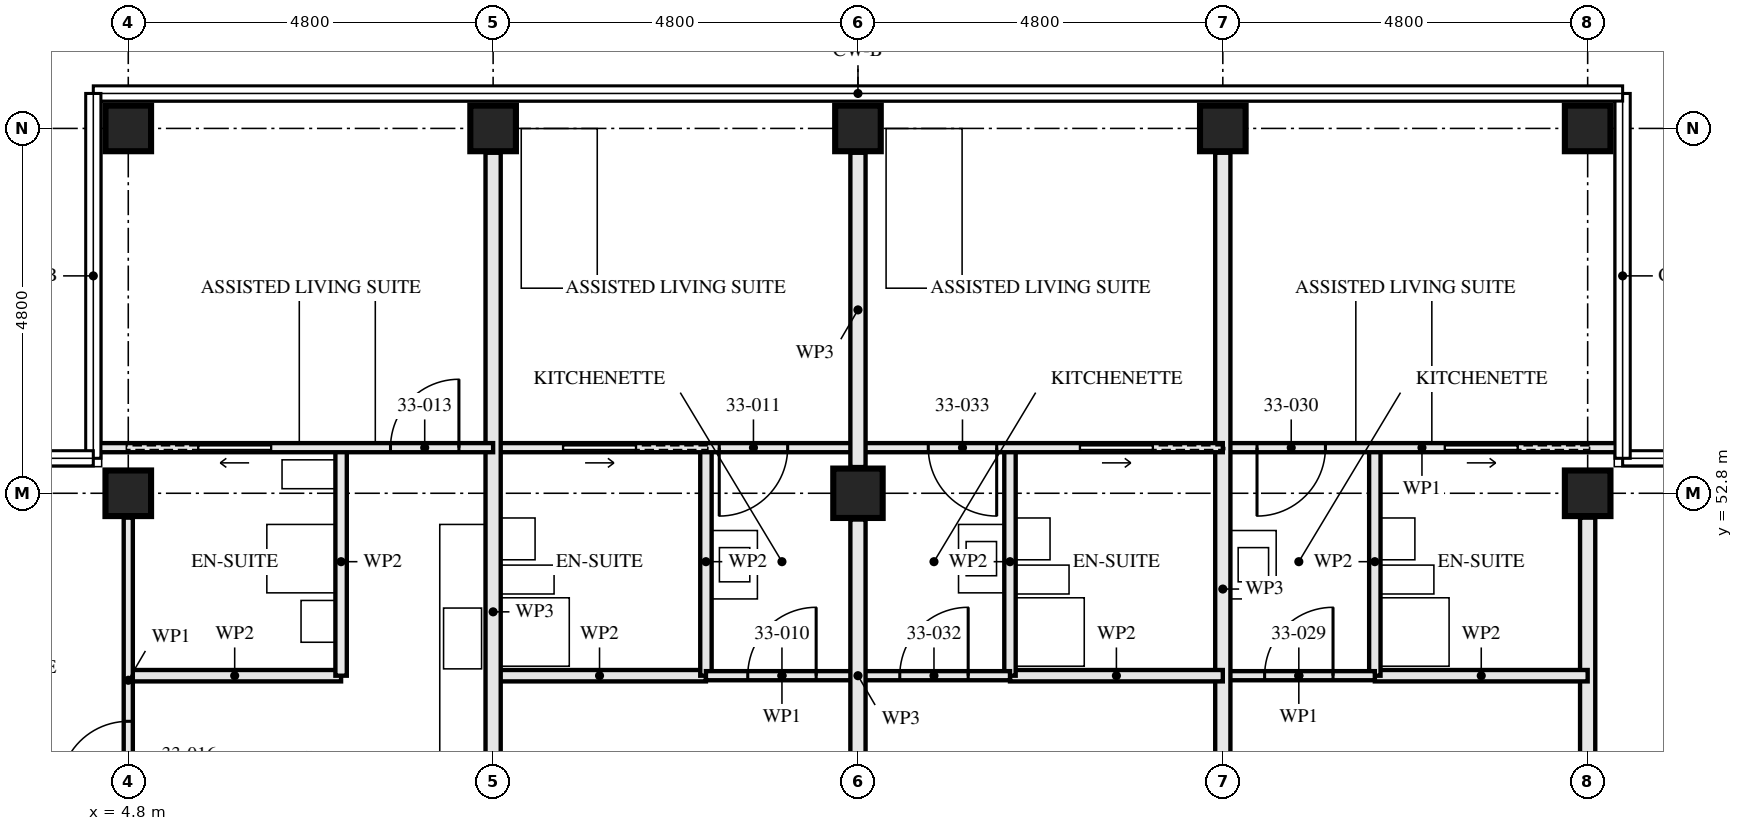
"""IFC4 building model, lengths in metres.
Left out: names, types, materials, properties, quantities, classifications, styles, units other than length and angle.
Written with IfcOpenShell. Run it as: python <this file> out.ifc"""

import sys

from ifc_helpers import new_model, si_unit, direction, frame, frame_2d, origin, origin_2d, place, context, subcontext, project, spatial, rectangle, hollow_rectangle, extrude, element, fill, save


model = new_model("IFC4")
c1 = context("Model", 3, precision=1e-05, world=origin(), true_north=direction((0.0, 1.0)))
c2 = subcontext(c1, "Body", "Model", "MODEL_VIEW")
j1 = project(units=[si_unit("LENGTHUNIT", "METRE"), si_unit("PLANEANGLEUNIT", "RADIAN")], contexts=[c1])
p1 = place(None, origin())
s1 = spatial("IfcSite", under=j1, at=p1, CompositionType="ELEMENT")
p2 = place(p1, origin())
s2 = spatial("IfcBuilding", under=s1, at=p2, CompositionType="ELEMENT")
p3 = place(p2, frame((0.0, 0.0, 122.5)))
s3 = spatial("IfcBuildingStorey", under=s2, at=p3, CompositionType="ELEMENT", Elevation=122.5)
for number, where, z_axis, x_axis in (
    (1, (4.8, 52.8, 0.0), (0.0, 0.0, 1.0), (0.0, 1.0, 0.0)),
    (2, (4.8, 57.6, 0.0), (0.0, 0.0, 1.0), (0.0, 1.0, 0.0)),
    (3, (9.6, 57.6, 0.0), (0.0, 0.0, 1.0), (0.0, 1.0, 0.0)),
):
    element("IfcColumn", number, at=place(p3, frame(where, z_axis=z_axis, x_axis=x_axis)), inside=s3, PredefinedType="COLUMN", context=c2, shape_type="SweptSolid", body=[
        extrude(hollow_rectangle(XDim=0.6, YDim=0.6, WallThickness=0.08, at=origin_2d()), origin(), (0.0, 0.0, 1.0), 3.5),
    ])
p4 = place(p3, frame((14.4, 52.8, 0.0), z_axis=(0.0, 0.0, 1.0), x_axis=(1.0, 0.0, 0.0)))
e4 = element("IfcColumn", 4, at=p4, inside=s3, PredefinedType="COLUMN", context=c2, shape_type="SweptSolid", body=[
    extrude(hollow_rectangle(XDim=0.65, YDim=0.65, WallThickness=0.05, at=origin_2d()), origin(), (0.0, 0.0, 1.0), 3.5),
])
for number, where, z_axis, x_axis in (
    (5, (14.4, 57.6, 0.0), (0.0, 0.0, 1.0), (0.0, 1.0, 0.0)),
    (6, (19.2, 57.6, 0.0), (0.0, 0.0, 1.0), (0.0, 1.0, 0.0)),
    (7, (24.0, 52.8, 0.0), (0.0, 0.0, 1.0), (0.0, 1.0, 0.0)),
    (8, (24.0, 57.6, 0.0), (0.0, 0.0, 1.0), (0.0, 1.0, 0.0)),
):
    element("IfcColumn", number, at=place(p3, frame(where, z_axis=z_axis, x_axis=x_axis)), inside=s3, PredefinedType="COLUMN", context=c2, shape_type="SweptSolid", body=[
        extrude(hollow_rectangle(XDim=0.6, YDim=0.6, WallThickness=0.08, at=origin_2d()), origin(), (0.0, 0.0, 1.0), 3.5),
    ])
p5 = place(p3, frame((12.4, 53.4, 0.0), z_axis=(0.0, 0.0, 1.0), x_axis=(0.0, -1.0, 0.0)))
e9 = element("IfcWall", 9, at=p5, inside=s3, PredefinedType="PARTITIONING", context=c2, shape_type="SweptSolid", body=[
    extrude(rectangle(XDim=3.0, YDim=0.15, at=frame_2d((1.5, 0.0))), origin(), (0.0, 0.0, 1.0), 2.55),
])
p6 = place(p3, frame((12.4, 50.4, 0.0), z_axis=(0.0, 0.0, 1.0), x_axis=(-1.0, 0.0, 0.0)))
e10 = element("IfcWall", 10, at=p6, inside=s3, PredefinedType="PARTITIONING", context=c2, shape_type="SweptSolid", body=[
    extrude(rectangle(XDim=2.8, YDim=0.15, at=frame_2d((1.4, 0.0))), origin(), (0.0, 0.0, 1.0), 3.33),
])
p7 = place(p3, frame((14.4, 50.4, 0.0), z_axis=(0.0, 0.0, 1.0), x_axis=(-1.0, 0.0, 0.0)))
e11 = element("IfcWall", 11, at=p7, inside=s3, PredefinedType="PARTITIONING", context=c2, shape_type="SweptSolid", body=[
    extrude(rectangle(XDim=2.0, YDim=0.12, at=frame_2d((1.0, 0.0))), origin(), (0.0, 0.0, 1.0), 3.33),
])
p8 = place(p7, frame((0.55, 0.0, 0.0)))
e12 = element("IfcOpeningElement", 12, at=p8, cuts=e11, PredefinedType="OPENING", context=c2, shape_type="SweptSolid", body=[
    extrude(rectangle(XDim=0.9, YDim=2.1, at=frame_2d((0.45, 1.05))), frame((0.0, 0.071, 0.0), z_axis=(0.0, -1.0, 0.0), x_axis=(1.0, 0.0, 0.0)), (0.0, 0.0, 1.0), 0.141),
])
p9 = place(p3, frame((14.4, 53.4, 0.0), z_axis=(0.0, 0.0, 1.0), x_axis=(-1.0, 0.0, 0.0)))
e13 = element("IfcWall", 13, at=p9, inside=s3, PredefinedType="PARTITIONING", context=c2, shape_type="SweptSolid", body=[
    extrude(rectangle(XDim=4.8, YDim=0.12, at=frame_2d((2.4, 0.0))), origin(), (0.0, 0.0, 1.0), 3.33),
])
p10 = place(p9, frame((0.925, 0.0, 0.0)))
e14 = element("IfcOpeningElement", 14, at=p10, cuts=e13, PredefinedType="OPENING", context=c2, shape_type="SweptSolid", body=[
    extrude(rectangle(XDim=0.9, YDim=2.1, at=frame_2d((0.45, 1.05))), frame((0.0, 0.071, 0.0), z_axis=(0.0, -1.0, 0.0), x_axis=(1.0, 0.0, 0.0)), (0.0, 0.0, 1.0), 0.141),
])
p11 = place(p9, frame((2.925, 0.0, 0.0)))
e15 = element("IfcOpeningElement", 15, at=p11, cuts=e13, PredefinedType="OPENING", context=c2, shape_type="SweptSolid", body=[
    extrude(rectangle(XDim=0.95, YDim=2.1, at=frame_2d((0.475, 1.05))), frame((0.0, 0.071, 0.0), z_axis=(0.0, -1.0, 0.0), x_axis=(1.0, 0.0, 0.0)), (0.0, 0.0, 1.0), 0.141),
])
p12 = place(p3, frame((9.6, 57.28, 0.0), z_axis=(0.0, 0.0, 1.0), x_axis=(0.0, -1.0, 0.0)))
e16 = element("IfcWall", 16, at=p12, inside=s3, PredefinedType="PARTITIONING", context=c2, shape_type="SweptSolid", body=[
    extrude(rectangle(XDim=12.08, YDim=0.2, at=frame_2d((6.04, 0.0))), origin(), (0.0, 0.0, 1.0), 2.55),
])
p13 = place(p3, frame((7.6, 53.4, 0.0), z_axis=(0.0, 0.0, 1.0), x_axis=(0.0, -1.0, 0.0)))
e17 = element("IfcWall", 17, at=p13, inside=s3, PredefinedType="PARTITIONING", context=c2, shape_type="SweptSolid", body=[
    extrude(rectangle(XDim=3.0, YDim=0.15, at=frame_2d((1.5, 0.0))), origin(), (0.0, 0.0, 1.0), 2.55),
])
p14 = place(p3, frame((7.6, 50.4, 0.0), z_axis=(0.0, 0.0, 1.0), x_axis=(-1.0, 0.0, 0.0)))
e18 = element("IfcWall", 18, at=p14, inside=s3, PredefinedType="PARTITIONING", context=c2, shape_type="SweptSolid", body=[
    extrude(rectangle(XDim=2.8, YDim=0.15, at=frame_2d((1.4, 0.0))), origin(), (0.0, 0.0, 1.0), 3.33),
])
p15 = place(p3, frame((9.6, 53.4, 0.0), z_axis=(0.0, 0.0, 1.0), x_axis=(-1.0, 0.0, 0.0)))
e19 = element("IfcWall", 19, at=p15, inside=s3, PredefinedType="PARTITIONING", context=c2, shape_type="SweptSolid", body=[
    extrude(rectangle(XDim=5.24, YDim=0.12, at=frame_2d((2.62, 0.0))), origin(), (0.0, 0.0, 1.0), 2.32),
])
p16 = place(p15, frame((0.45, 0.0, 0.0)))
e20 = element("IfcOpeningElement", 20, at=p16, cuts=e19, PredefinedType="OPENING", context=c2, shape_type="SweptSolid", body=[
    extrude(rectangle(XDim=0.9, YDim=2.1, at=frame_2d((0.45, 1.05))), frame((0.0, 0.071, 0.0), z_axis=(0.0, -1.0, 0.0), x_axis=(1.0, 0.0, 0.0)), (0.0, 0.0, 1.0), 0.141),
])
p17 = place(p15, frame((2.925, 0.0, 0.0)))
e21 = element("IfcOpeningElement", 21, at=p17, cuts=e19, PredefinedType="OPENING", context=c2, shape_type="SweptSolid", body=[
    extrude(rectangle(XDim=0.95, YDim=2.1, at=frame_2d((0.475, 1.05))), frame((0.0, 0.071, 0.0), z_axis=(0.0, -1.0, 0.0), x_axis=(1.0, 0.0, 0.0)), (0.0, 0.0, 1.0), 0.141),
])
p18 = place(p3, frame((4.8, 52.48, 0.0), z_axis=(0.0, 0.0, 1.0), x_axis=(0.0, -1.0, 0.0)))
e22 = element("IfcWall", 22, at=p18, inside=s3, PredefinedType="PARTITIONING", context=c2, shape_type="SweptSolid", body=[
    extrude(rectangle(XDim=4.28, YDim=0.12, at=frame_2d((2.14, 0.0))), origin(), (0.0, 0.0, 1.0), 3.33),
])
p19 = place(p18, frame((2.68, 0.0, 0.0)))
e23 = element("IfcOpeningElement", 23, at=p19, cuts=e22, PredefinedType="OPENING", context=c2, shape_type="SweptSolid", body=[
    extrude(rectangle(XDim=0.9, YDim=2.1, at=frame_2d((0.45, 1.05))), frame((0.0, 0.071, 0.0), z_axis=(0.0, -1.0, 0.0), x_axis=(1.0, 0.0, 0.0)), (0.0, 0.0, 1.0), 0.141),
])
p20 = place(p3, frame((24.0, 52.48, 0.0), z_axis=(0.0, 0.0, 1.0), x_axis=(0.0, -1.0, 0.0)))
e24 = element("IfcWall", 24, at=p20, inside=s3, PredefinedType="PARTITIONING", context=c2, shape_type="SweptSolid", body=[
    extrude(rectangle(XDim=6.68, YDim=0.2, at=frame_2d((3.34, 0.0))), origin(), (0.0, 0.0, 1.0), 2.55),
])
p21 = place(p3, frame((21.2, 53.4, 0.0), z_axis=(0.0, 0.0, 1.0), x_axis=(0.0, -1.0, 0.0)))
e25 = element("IfcWall", 25, at=p21, inside=s3, PredefinedType="PARTITIONING", context=c2, shape_type="SweptSolid", body=[
    extrude(rectangle(XDim=3.0, YDim=0.15, at=frame_2d((1.5, 0.0))), origin(), (0.0, 0.0, 1.0), 2.55),
])
p22 = place(p3, frame((24.0, 50.4, 0.0), z_axis=(0.0, 0.0, 1.0), x_axis=(-1.0, 0.0, 0.0)))
e26 = element("IfcWall", 26, at=p22, inside=s3, PredefinedType="PARTITIONING", context=c2, shape_type="SweptSolid", body=[
    extrude(rectangle(XDim=2.8, YDim=0.15, at=frame_2d((1.4, 0.0))), origin(), (0.0, 0.0, 1.0), 3.33),
])
p23 = place(p3, frame((21.2, 50.4, 0.0), z_axis=(0.0, 0.0, 1.0), x_axis=(-1.0, 0.0, 0.0)))
e27 = element("IfcWall", 27, at=p23, inside=s3, PredefinedType="PARTITIONING", context=c2, shape_type="SweptSolid", body=[
    extrude(rectangle(XDim=2.0, YDim=0.12, at=frame_2d((1.0, 0.0))), origin(), (0.0, 0.0, 1.0), 3.33),
])
p24 = place(p23, frame((0.55, 0.0, 0.0)))
e28 = element("IfcOpeningElement", 28, at=p24, cuts=e27, PredefinedType="OPENING", context=c2, shape_type="SweptSolid", body=[
    extrude(rectangle(XDim=0.9, YDim=2.1, at=frame_2d((0.45, 1.05))), frame((0.0, 0.071, 0.0), z_axis=(0.0, -1.0, 0.0), x_axis=(1.0, 0.0, 0.0)), (0.0, 0.0, 1.0), 0.141),
])
p25 = place(p3, frame((24.44, 53.4, 0.0), z_axis=(0.0, 0.0, 1.0), x_axis=(-1.0, 0.0, 0.0)))
e29 = element("IfcWall", 29, at=p25, inside=s3, PredefinedType="PARTITIONING", context=c2, shape_type="SweptSolid", body=[
    extrude(rectangle(XDim=5.24, YDim=0.12, at=frame_2d((2.62, 0.0))), origin(), (0.0, 0.0, 1.0), 2.32),
])
p26 = place(p25, frame((3.89, 0.0, 0.0)))
e30 = element("IfcOpeningElement", 30, at=p26, cuts=e29, PredefinedType="OPENING", context=c2, shape_type="SweptSolid", body=[
    extrude(rectangle(XDim=0.9, YDim=2.1, at=frame_2d((0.45, 1.05))), frame((0.0, 0.071, 0.0), z_axis=(0.0, -1.0, 0.0), x_axis=(1.0, 0.0, 0.0)), (0.0, 0.0, 1.0), 0.141),
])
p27 = place(p25, frame((1.365, 0.0, 0.0)))
e31 = element("IfcOpeningElement", 31, at=p27, cuts=e29, PredefinedType="OPENING", context=c2, shape_type="SweptSolid", body=[
    extrude(rectangle(XDim=0.95, YDim=2.1, at=frame_2d((0.475, 1.05))), frame((0.0, 0.071, 0.0), z_axis=(0.0, -1.0, 0.0), x_axis=(1.0, 0.0, 0.0)), (0.0, 0.0, 1.0), 0.141),
])
p28 = place(p3, frame((19.2, 57.28, 0.0), z_axis=(0.0, 0.0, 1.0), x_axis=(0.0, -1.0, 0.0)))
e32 = element("IfcWall", 32, at=p28, inside=s3, PredefinedType="PARTITIONING", context=c2, shape_type="SweptSolid", body=[
    extrude(rectangle(XDim=11.48, YDim=0.2, at=frame_2d((5.74, 0.0))), origin(), (0.0, 0.0, 1.0), 2.55),
])
p29 = place(p3, frame((16.4, 53.4, 0.0), z_axis=(0.0, 0.0, 1.0), x_axis=(0.0, -1.0, 0.0)))
e33 = element("IfcWall", 33, at=p29, inside=s3, PredefinedType="PARTITIONING", context=c2, shape_type="SweptSolid", body=[
    extrude(rectangle(XDim=3.0, YDim=0.15, at=frame_2d((1.5, 0.0))), origin(), (0.0, 0.0, 1.0), 2.55),
])
p30 = place(p3, frame((19.2, 50.4, 0.0), z_axis=(0.0, 0.0, 1.0), x_axis=(-1.0, 0.0, 0.0)))
e34 = element("IfcWall", 34, at=p30, inside=s3, PredefinedType="PARTITIONING", context=c2, shape_type="SweptSolid", body=[
    extrude(rectangle(XDim=2.8, YDim=0.15, at=frame_2d((1.4, 0.0))), origin(), (0.0, 0.0, 1.0), 3.33),
])
p31 = place(p3, frame((16.4, 50.4, 0.0), z_axis=(0.0, 0.0, 1.0), x_axis=(-1.0, 0.0, 0.0)))
e35 = element("IfcWall", 35, at=p31, inside=s3, PredefinedType="PARTITIONING", context=c2, shape_type="SweptSolid", body=[
    extrude(rectangle(XDim=2.0, YDim=0.12, at=frame_2d((1.0, 0.0))), origin(), (0.0, 0.0, 1.0), 3.33),
])
p32 = place(p31, frame((0.55, 0.0, 0.0)))
e36 = element("IfcOpeningElement", 36, at=p32, cuts=e35, PredefinedType="OPENING", context=c2, shape_type="SweptSolid", body=[
    extrude(rectangle(XDim=0.9, YDim=2.1, at=frame_2d((0.45, 1.05))), frame((0.0, 0.071, 0.0), z_axis=(0.0, -1.0, 0.0), x_axis=(1.0, 0.0, 0.0)), (0.0, 0.0, 1.0), 0.141),
])
p33 = place(p3, frame((19.2, 53.4, 0.0), z_axis=(0.0, 0.0, 1.0), x_axis=(-1.0, 0.0, 0.0)))
e37 = element("IfcWall", 37, at=p33, inside=s3, PredefinedType="PARTITIONING", context=c2, shape_type="SweptSolid", body=[
    extrude(rectangle(XDim=4.8, YDim=0.12, at=frame_2d((2.4, 0.0))), origin(), (0.0, 0.0, 1.0), 3.33),
])
p34 = place(p33, frame((2.975, 0.0, 0.0)))
e38 = element("IfcOpeningElement", 38, at=p34, cuts=e37, PredefinedType="OPENING", context=c2, shape_type="SweptSolid", body=[
    extrude(rectangle(XDim=0.9, YDim=2.1, at=frame_2d((0.45, 1.05))), frame((0.0, 0.071, 0.0), z_axis=(0.0, -1.0, 0.0), x_axis=(1.0, 0.0, 0.0)), (0.0, 0.0, 1.0), 0.141),
])
p35 = place(p33, frame((0.925, 0.0, 0.0)))
e39 = element("IfcOpeningElement", 39, at=p35, cuts=e37, PredefinedType="OPENING", context=c2, shape_type="SweptSolid", body=[
    extrude(rectangle(XDim=0.95, YDim=2.1, at=frame_2d((0.475, 1.05))), frame((0.0, 0.071, 0.0), z_axis=(0.0, -1.0, 0.0), x_axis=(1.0, 0.0, 0.0)), (0.0, 0.0, 1.0), 0.141),
])
p36 = place(p3, frame((14.4, 48.345, 0.0), z_axis=(0.0, 0.0, 1.0), x_axis=(0.0, 1.0, 0.0)))
e40 = element("IfcWall", 40, at=p36, inside=s3, PredefinedType="PARTITIONING", context=c2, shape_type="SweptSolid", body=[
    extrude(rectangle(XDim=4.11, YDim=0.2, at=frame_2d((2.055, 0.0))), origin(), (0.0, 0.0, 1.0), 2.32),
])
p37 = place(p3, frame((14.4, 53.145, 0.0), z_axis=(0.0, 0.0, 1.0), x_axis=(0.0, 1.0, 0.0)))
e41 = element("IfcWall", 41, at=p37, inside=s3, PredefinedType="PARTITIONING", context=c2, shape_type="SweptSolid", body=[
    extrude(rectangle(XDim=4.135, YDim=0.2, at=frame_2d((2.067, 0.0))), origin(), (0.0, 0.0, 1.0), 2.32),
])
p38 = place(p8, frame((0.9, 0.0, 0.0), z_axis=(0.0, 0.0, 1.0), x_axis=(-1.0, 0.0, 0.0)))
e42 = element("IfcDoor", 42, at=p38, inside=s3, OperationType="SINGLE_SWING_LEFT", PredefinedType="DOOR", context=c2, shape_type="SweptSolid", body=[
    extrude(rectangle(XDim=0.9, YDim=2.1, at=frame_2d((0.45, 1.05))), frame((0.0, 0.022, 0.0), z_axis=(0.0, -1.0, 0.0), x_axis=(1.0, 0.0, 0.0)), (0.0, 0.0, 1.0), 0.044),
])
fill(e12, e42)
p39 = place(p10, origin())
e43 = element("IfcDoor", 43, at=p39, inside=s3, OperationType="SINGLE_SWING_LEFT", PredefinedType="DOOR", context=c2, shape_type="SweptSolid", body=[
    extrude(rectangle(XDim=0.9, YDim=2.1, at=frame_2d((0.45, 1.05))), frame((0.0, 0.022, 0.0), z_axis=(0.0, -1.0, 0.0), x_axis=(1.0, 0.0, 0.0)), (0.0, 0.0, 1.0), 0.044),
])
fill(e14, e43)
p40 = place(p11, origin())
e44 = element("IfcDoor", 44, at=p40, inside=s3, OperationType="SLIDING_TO_RIGHT", PredefinedType="DOOR", context=c2, shape_type="SweptSolid", body=[
    extrude(rectangle(XDim=0.95, YDim=2.1, at=frame_2d((0.475, 1.05))), frame((0.0, 0.022, 0.0), z_axis=(0.0, -1.0, 0.0), x_axis=(1.0, 0.0, 0.0)), (0.0, 0.0, 1.0), 0.044),
])
fill(e15, e44)
p41 = place(p16, frame((0.9, 0.0, 0.0), z_axis=(0.0, 0.0, 1.0), x_axis=(-1.0, 0.0, 0.0)))
e45 = element("IfcDoor", 45, at=p41, inside=s3, OperationType="SINGLE_SWING_LEFT", PredefinedType="DOOR", context=c2, shape_type="SweptSolid", body=[
    extrude(rectangle(XDim=0.9, YDim=2.1, at=frame_2d((0.45, 1.05))), frame((0.0, 0.022, 0.0), z_axis=(0.0, -1.0, 0.0), x_axis=(1.0, 0.0, 0.0)), (0.0, 0.0, 1.0), 0.044),
])
fill(e20, e45)
p42 = place(p17, origin())
e46 = element("IfcDoor", 46, at=p42, inside=s3, OperationType="SLIDING_TO_LEFT", PredefinedType="DOOR", context=c2, shape_type="SweptSolid", body=[
    extrude(rectangle(XDim=0.95, YDim=2.1, at=frame_2d((0.475, 1.05))), frame((0.0, 0.022, 0.0), z_axis=(0.0, -1.0, 0.0), x_axis=(1.0, 0.0, 0.0)), (0.0, 0.0, 1.0), 0.044),
])
fill(e21, e46)
p43 = place(p19, frame((0.9, 0.0, 0.0), z_axis=(0.0, 0.0, 1.0), x_axis=(-1.0, 0.0, 0.0)))
e47 = element("IfcDoor", 47, at=p43, inside=s3, OperationType="SINGLE_SWING_RIGHT", PredefinedType="DOOR", context=c2, shape_type="SweptSolid", body=[
    extrude(rectangle(XDim=0.9, YDim=2.1, at=frame_2d((0.45, 1.05))), frame((0.0, 0.022, 0.0), z_axis=(0.0, -1.0, 0.0), x_axis=(1.0, 0.0, 0.0)), (0.0, 0.0, 1.0), 0.044),
])
fill(e23, e47)
p44 = place(p24, frame((0.9, 0.0, 0.0), z_axis=(0.0, 0.0, 1.0), x_axis=(-1.0, 0.0, 0.0)))
e48 = element("IfcDoor", 48, at=p44, inside=s3, OperationType="SINGLE_SWING_LEFT", PredefinedType="DOOR", context=c2, shape_type="SweptSolid", body=[
    extrude(rectangle(XDim=0.9, YDim=2.1, at=frame_2d((0.45, 1.05))), frame((0.0, 0.022, 0.0), z_axis=(0.0, -1.0, 0.0), x_axis=(1.0, 0.0, 0.0)), (0.0, 0.0, 1.0), 0.044),
])
fill(e28, e48)
p45 = place(p26, origin())
e49 = element("IfcDoor", 49, at=p45, inside=s3, OperationType="SINGLE_SWING_LEFT", PredefinedType="DOOR", context=c2, shape_type="SweptSolid", body=[
    extrude(rectangle(XDim=0.9, YDim=2.1, at=frame_2d((0.45, 1.05))), frame((0.0, 0.022, 0.0), z_axis=(0.0, -1.0, 0.0), x_axis=(1.0, 0.0, 0.0)), (0.0, 0.0, 1.0), 0.044),
])
fill(e30, e49)
p46 = place(p27, origin())
e50 = element("IfcDoor", 50, at=p46, inside=s3, OperationType="SLIDING_TO_RIGHT", PredefinedType="DOOR", context=c2, shape_type="SweptSolid", body=[
    extrude(rectangle(XDim=0.95, YDim=2.1, at=frame_2d((0.475, 1.05))), frame((0.0, 0.022, 0.0), z_axis=(0.0, -1.0, 0.0), x_axis=(1.0, 0.0, 0.0)), (0.0, 0.0, 1.0), 0.044),
])
fill(e31, e50)
p47 = place(p32, frame((0.9, 0.0, 0.0), z_axis=(0.0, 0.0, 1.0), x_axis=(-1.0, 0.0, 0.0)))
e51 = element("IfcDoor", 51, at=p47, inside=s3, OperationType="SINGLE_SWING_LEFT", PredefinedType="DOOR", context=c2, shape_type="SweptSolid", body=[
    extrude(rectangle(XDim=0.9, YDim=2.1, at=frame_2d((0.45, 1.05))), frame((0.0, 0.022, 0.0), z_axis=(0.0, -1.0, 0.0), x_axis=(1.0, 0.0, 0.0)), (0.0, 0.0, 1.0), 0.044),
])
fill(e36, e51)
p48 = place(p34, origin())
e52 = element("IfcDoor", 52, at=p48, inside=s3, OperationType="SINGLE_SWING_RIGHT", PredefinedType="DOOR", context=c2, shape_type="SweptSolid", body=[
    extrude(rectangle(XDim=0.9, YDim=2.1, at=frame_2d((0.45, 1.05))), frame((0.0, 0.022, 0.0), z_axis=(0.0, -1.0, 0.0), x_axis=(1.0, 0.0, 0.0)), (0.0, 0.0, 1.0), 0.044),
])
fill(e38, e52)
p49 = place(p35, origin())
e53 = element("IfcDoor", 53, at=p49, inside=s3, OperationType="SLIDING_TO_RIGHT", PredefinedType="DOOR", context=c2, shape_type="SweptSolid", body=[
    extrude(rectangle(XDim=0.95, YDim=2.1, at=frame_2d((0.475, 1.05))), frame((0.0, 0.022, 0.0), z_axis=(0.0, -1.0, 0.0), x_axis=(1.0, 0.0, 0.0)), (0.0, 0.0, 1.0), 0.044),
])
fill(e39, e53)
save(model, sys.argv[1])
